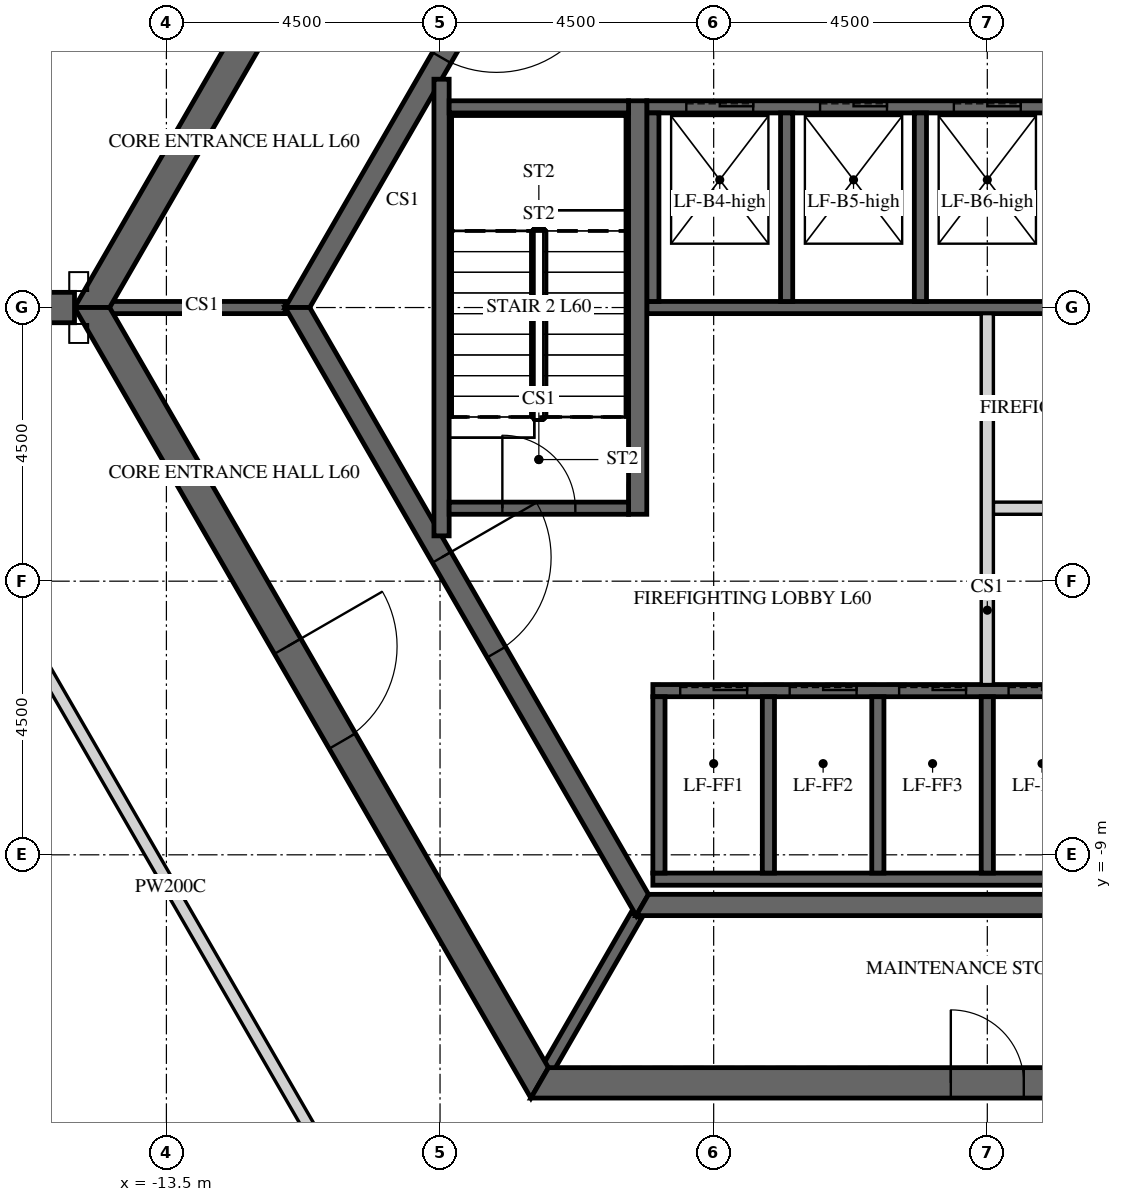
"""IFC4 building model, lengths in metres.
Left out: names, types, materials, properties, quantities, classifications, styles, units other than length and angle.
Written with IfcOpenShell. Run it as: python <this file> out.ifc"""

import sys

from ifc_helpers import new_model, si_unit, direction, frame, frame_2d, origin, place, context, subcontext, project, spatial, polyline, rectangle, outline, extrude, element, fill, save


model = new_model("IFC4")
c1 = context("Model", 3, precision=1e-05, world=origin(), true_north=direction((0.0, 1.0)))
c2 = subcontext(c1, "Body", "Model", "MODEL_VIEW")
j1 = project(units=[si_unit("LENGTHUNIT", "METRE"), si_unit("PLANEANGLEUNIT", "RADIAN")], contexts=[c1])
p1 = place(None, origin())
s1 = spatial("IfcSite", under=j1, at=p1, CompositionType="ELEMENT")
p2 = place(p1, origin())
s2 = spatial("IfcBuilding", under=s1, at=p2, CompositionType="ELEMENT")
p3 = place(p2, frame((0.0, 0.0, 250.2)))
s3 = spatial("IfcBuildingStorey", under=s2, at=p3, CompositionType="ELEMENT", Elevation=250.2)
p4 = place(p3, frame((-7.361, 12.75, -0.3), z_axis=(0.0, 0.0, 1.0), x_axis=(-0.50000571537, -0.866022103989, 0.0)))
e1 = element("IfcWall", 1, at=p4, inside=s3, PredefinedType="SHEAR", context=c2, shape_type="SweptSolid", body=[
    extrude(outline(polyline([(-0.144, -0.25), (14.867, -0.25), (14.578, 0.25), (0.144, 0.25), (-0.144, -0.25)])), origin(), (0.0, 0.0, 1.0), 5.8),
])
p5 = place(p4, frame((6.49, 0.0, 0.3)))
e2 = element("IfcOpeningElement", 2, at=p5, cuts=e1, PredefinedType="OPENING", context=c2, shape_type="SweptSolid", body=[
    extrude(rectangle(XDim=1.8, YDim=2.4, at=frame_2d((0.9, 1.2))), frame((0.0, 0.26, 0.0), z_axis=(0.0, -1.0, 0.0), x_axis=(1.0, 0.0, 0.0)), (0.0, 0.0, 1.0), 0.52),
])
p6 = place(p3, frame((-14.722, 0.0, -0.3), z_axis=(0.0, 0.0, 1.0), x_axis=(0.50000571537, -0.866022103989, 0.0)))
e3 = element("IfcWall", 3, at=p6, inside=s3, PredefinedType="SHEAR", context=c2, shape_type="SweptSolid", body=[
    extrude(outline(polyline([(-0.144, -0.25), (14.867, -0.25), (14.578, 0.25), (0.144, 0.25), (-0.144, -0.25)])), origin(), (0.0, 0.0, 1.0), 5.8),
])
p7 = place(p6, frame((6.432, 0.0, 0.3)))
e4 = element("IfcOpeningElement", 4, at=p7, cuts=e3, PredefinedType="OPENING", context=c2, shape_type="SweptSolid", body=[
    extrude(rectangle(XDim=1.8, YDim=2.4, at=frame_2d((0.9, 1.2))), frame((0.0, 0.26, 0.0), z_axis=(0.0, -1.0, 0.0), x_axis=(1.0, 0.0, 0.0)), (0.0, 0.0, 1.0), 0.52),
])
p8 = place(p3, frame((-7.361, -12.75, -0.3), z_axis=(0.0, 0.0, 1.0), x_axis=(1.0, 0.0, 0.0)))
e5 = element("IfcWall", 5, at=p8, inside=s3, PredefinedType="SHEAR", context=c2, shape_type="SweptSolid", body=[
    extrude(outline(polyline([(-0.144, -0.25), (14.866, -0.25), (14.578, 0.25), (0.144, 0.25), (-0.144, -0.25)])), origin(), (0.0, 0.0, 1.0), 5.8),
])
p9 = place(p8, frame((6.761, 0.0, 0.3)))
e6 = element("IfcOpeningElement", 6, at=p9, cuts=e5, PredefinedType="OPENING", context=c2, shape_type="SweptSolid", body=[
    extrude(rectangle(XDim=1.2, YDim=2.4, at=frame_2d((0.6, 1.2))), frame((0.0, 0.26, 0.0), z_axis=(0.0, -1.0, 0.0), x_axis=(1.0, 0.0, 0.0)), (0.0, 0.0, 1.0), 0.52),
])
p10 = place(p3, frame((-15.011, 0.0, -0.3), z_axis=(0.0, 0.0, 1.0), x_axis=(-1.0, 0.0, 0.0)))
e7 = element("IfcWall", 7, at=p10, inside=s3, PredefinedType="SHEAR", context=c2, shape_type="SweptSolid", body=[
    extrude(rectangle(XDim=15.424, YDim=0.5, at=frame_2d((7.712, 0.0))), origin(), (0.0, 0.0, 1.0), 5.8),
])
p11 = place(p10, frame((6.812, 0.0, 0.3)))
e8 = element("IfcOpeningElement", 8, at=p11, cuts=e7, PredefinedType="OPENING", context=c2, shape_type="SweptSolid", body=[
    extrude(rectangle(XDim=1.8, YDim=2.4, at=frame_2d((0.9, 1.2))), frame((0.0, 0.26, 0.0), z_axis=(0.0, -1.0, 0.0), x_axis=(1.0, 0.0, 0.0)), (0.0, 0.0, 1.0), 0.52),
])
p12 = place(p3, frame((-5.673, 9.825, -0.3), z_axis=(0.0, 0.0, 1.0), x_axis=(-0.499995046907, -0.866028263435, 0.0)))
e9 = element("IfcWall", 9, at=p12, inside=s3, PredefinedType="SHEAR", context=c2, shape_type="SweptSolid", body=[
    extrude(outline(polyline([(-0.101, -0.175), (11.446, -0.175), (11.244, 0.175), (0.101, 0.175), (-0.101, -0.175)])), origin(), (0.0, 0.0, 1.0), 5.8),
])
p13 = place(p12, frame((4.801, 0.0, 0.3)))
e10 = element("IfcOpeningElement", 10, at=p13, cuts=e9, PredefinedType="OPENING", context=c2, shape_type="SweptSolid", body=[
    extrude(rectangle(XDim=1.8, YDim=2.4, at=frame_2d((0.9, 1.2))), frame((0.0, 0.185, 0.0), z_axis=(0.0, -1.0, 0.0), x_axis=(1.0, 0.0, 0.0)), (0.0, 0.0, 1.0), 0.37),
])
p14 = place(p3, frame((-11.345, 0.0, -0.3), z_axis=(0.0, 0.0, 1.0), x_axis=(0.499995046907, -0.866028263435, 0.0)))
e11 = element("IfcWall", 11, at=p14, inside=s3, PredefinedType="SHEAR", context=c2, shape_type="SweptSolid", body=[
    extrude(outline(polyline([(-0.101, -0.175), (11.446, -0.175), (11.244, 0.175), (0.101, 0.175), (-0.101, -0.175)])), origin(), (0.0, 0.0, 1.0), 5.8),
])
p15 = place(p14, frame((4.744, 0.0, 0.3)))
e12 = element("IfcOpeningElement", 12, at=p15, cuts=e11, PredefinedType="OPENING", context=c2, shape_type="SweptSolid", body=[
    extrude(rectangle(XDim=1.8, YDim=2.4, at=frame_2d((0.9, 1.2))), frame((0.0, 0.185, 0.0), z_axis=(0.0, -1.0, 0.0), x_axis=(1.0, 0.0, 0.0)), (0.0, 0.0, 1.0), 0.37),
])
p16 = place(p3, frame((-5.673, -9.825, -0.3), z_axis=(0.0, 0.0, 1.0), x_axis=(1.0, 0.0, 0.0)))
e13 = element("IfcWall", 13, at=p16, inside=s3, PredefinedType="SHEAR", context=c2, shape_type="SweptSolid", body=[
    extrude(outline(polyline([(-0.101, -0.175), (11.446, -0.175), (11.244, 0.175), (0.101, 0.175), (-0.101, -0.175)])), origin(), (0.0, 0.0, 1.0), 5.8),
])
p17 = place(p3, frame((-5.6, 3.3, -0.25), z_axis=(0.0, 0.0, 1.0), x_axis=(1.0, 0.0, 0.0)))
e14 = element("IfcWall", 14, at=p17, inside=s3, PredefinedType="SHEAR", context=c2, shape_type="SweptSolid", body=[
    extrude(rectangle(XDim=11.2, YDim=0.2, at=frame_2d((5.6, 0.0))), origin(), (0.0, 0.0, 1.0), 5.75),
])
p18 = place(p17, frame((0.65, 0.0, 0.25)))
e15 = element("IfcOpeningElement", 15, at=p18, cuts=e14, PredefinedType="OPENING", context=c2, shape_type="SweptSolid", body=[
    extrude(rectangle(XDim=1.1, YDim=2.1, at=frame_2d((0.55, 1.05))), frame((0.0, 0.11, 0.0), z_axis=(0.0, -1.0, 0.0), x_axis=(1.0, 0.0, 0.0)), (0.0, 0.0, 1.0), 0.22),
])
p19 = place(p17, frame((2.85, 0.0, 0.25)))
e16 = element("IfcOpeningElement", 16, at=p19, cuts=e14, PredefinedType="OPENING", context=c2, shape_type="SweptSolid", body=[
    extrude(rectangle(XDim=1.1, YDim=2.1, at=frame_2d((0.55, 1.05))), frame((0.0, 0.11, 0.0), z_axis=(0.0, -1.0, 0.0), x_axis=(1.0, 0.0, 0.0)), (0.0, 0.0, 1.0), 0.22),
])
p20 = place(p17, frame((5.05, 0.0, 0.25)))
e17 = element("IfcOpeningElement", 17, at=p20, cuts=e14, PredefinedType="OPENING", context=c2, shape_type="SweptSolid", body=[
    extrude(rectangle(XDim=1.1, YDim=2.1, at=frame_2d((0.55, 1.05))), frame((0.0, 0.11, 0.0), z_axis=(0.0, -1.0, 0.0), x_axis=(1.0, 0.0, 0.0)), (0.0, 0.0, 1.0), 0.22),
])
p21 = place(p17, frame((7.25, 0.0, 0.25)))
e18 = element("IfcOpeningElement", 18, at=p21, cuts=e14, PredefinedType="OPENING", context=c2, shape_type="SweptSolid", body=[
    extrude(rectangle(XDim=1.1, YDim=2.1, at=frame_2d((0.55, 1.05))), frame((0.0, 0.11, 0.0), z_axis=(0.0, -1.0, 0.0), x_axis=(1.0, 0.0, 0.0)), (0.0, 0.0, 1.0), 0.22),
])
p22 = place(p17, frame((9.45, 0.0, 0.25)))
e19 = element("IfcOpeningElement", 19, at=p22, cuts=e14, PredefinedType="OPENING", context=c2, shape_type="SweptSolid", body=[
    extrude(rectangle(XDim=1.1, YDim=2.1, at=frame_2d((0.55, 1.05))), frame((0.0, 0.11, 0.0), z_axis=(0.0, -1.0, 0.0), x_axis=(1.0, 0.0, 0.0)), (0.0, 0.0, 1.0), 0.22),
])
p23 = place(p3, frame((-5.6, 0.0, -0.25), z_axis=(0.0, 0.0, 1.0), x_axis=(1.0, 0.0, 0.0)))
e20 = element("IfcWall", 20, at=p23, inside=s3, PredefinedType="SHEAR", context=c2, shape_type="SweptSolid", body=[
    extrude(rectangle(XDim=11.2, YDim=0.2, at=frame_2d((5.6, 0.0))), origin(), (0.0, 0.0, 1.0), 5.75),
])
for number, where, z_axis, x_axis in (
    (21, (-5.5, 0.1, -0.25), (0.0, 0.0, 1.0), (0.0, 1.0, 0.0)),
    (22, (-3.3, 0.1, -0.25), (0.0, 0.0, 1.0), (0.0, 1.0, 0.0)),
    (23, (-1.1, 0.1, -0.25), (0.0, 0.0, 1.0), (0.0, 1.0, 0.0)),
):
    element("IfcWall", number, at=place(p3, frame(where, z_axis=z_axis, x_axis=x_axis)), inside=s3, PredefinedType="SHEAR", context=c2, shape_type="SweptSolid", body=[
        extrude(rectangle(XDim=3.1, YDim=0.2, at=frame_2d((1.55, 0.0))), origin(), (0.0, 0.0, 1.0), 5.75),
    ])
p24 = place(p3, frame((-5.5, -6.3, -0.25), z_axis=(0.0, 0.0, 1.0), x_axis=(1.0, 0.0, 0.0)))
e24 = element("IfcWall", 24, at=p24, inside=s3, PredefinedType="SHEAR", context=c2, shape_type="SweptSolid", body=[
    extrude(rectangle(XDim=9.2, YDim=0.2, at=frame_2d((4.6, 0.0))), origin(), (0.0, 0.0, 1.0), 5.75),
])
p25 = place(p24, frame((0.45, 0.0, 0.25)))
e25 = element("IfcOpeningElement", 25, at=p25, cuts=e24, PredefinedType="OPENING", context=c2, shape_type="SweptSolid", body=[
    extrude(rectangle(XDim=1.1, YDim=2.1, at=frame_2d((0.55, 1.05))), frame((0.0, 0.11, 0.0), z_axis=(0.0, -1.0, 0.0), x_axis=(1.0, 0.0, 0.0)), (0.0, 0.0, 1.0), 0.22),
])
p26 = place(p24, frame((2.25, 0.0, 0.25)))
e26 = element("IfcOpeningElement", 26, at=p26, cuts=e24, PredefinedType="OPENING", context=c2, shape_type="SweptSolid", body=[
    extrude(rectangle(XDim=1.1, YDim=2.1, at=frame_2d((0.55, 1.05))), frame((0.0, 0.11, 0.0), z_axis=(0.0, -1.0, 0.0), x_axis=(1.0, 0.0, 0.0)), (0.0, 0.0, 1.0), 0.22),
])
p27 = place(p24, frame((4.05, 0.0, 0.25)))
e27 = element("IfcOpeningElement", 27, at=p27, cuts=e24, PredefinedType="OPENING", context=c2, shape_type="SweptSolid", body=[
    extrude(rectangle(XDim=1.1, YDim=2.1, at=frame_2d((0.55, 1.05))), frame((0.0, 0.11, 0.0), z_axis=(0.0, -1.0, 0.0), x_axis=(1.0, 0.0, 0.0)), (0.0, 0.0, 1.0), 0.22),
])
p28 = place(p24, frame((5.85, 0.0, 0.25)))
e28 = element("IfcOpeningElement", 28, at=p28, cuts=e24, PredefinedType="OPENING", context=c2, shape_type="SweptSolid", body=[
    extrude(rectangle(XDim=1.1, YDim=2.1, at=frame_2d((0.55, 1.05))), frame((0.0, 0.11, 0.0), z_axis=(0.0, -1.0, 0.0), x_axis=(1.0, 0.0, 0.0)), (0.0, 0.0, 1.0), 0.22),
])
p29 = place(p24, frame((7.65, 0.0, 0.25)))
e29 = element("IfcOpeningElement", 29, at=p29, cuts=e24, PredefinedType="OPENING", context=c2, shape_type="SweptSolid", body=[
    extrude(rectangle(XDim=1.1, YDim=2.1, at=frame_2d((0.55, 1.05))), frame((0.0, 0.11, 0.0), z_axis=(0.0, -1.0, 0.0), x_axis=(1.0, 0.0, 0.0)), (0.0, 0.0, 1.0), 0.22),
])
p30 = place(p3, frame((-5.5, -9.4, -0.25), z_axis=(0.0, 0.0, 1.0), x_axis=(1.0, 0.0, 0.0)))
e30 = element("IfcWall", 30, at=p30, inside=s3, PredefinedType="SHEAR", context=c2, shape_type="SweptSolid", body=[
    extrude(rectangle(XDim=9.2, YDim=0.2, at=frame_2d((4.6, 0.0))), origin(), (0.0, 0.0, 1.0), 5.75),
])
for number, where, z_axis, x_axis in (
    (31, (-5.4, -9.3, -0.25), (0.0, 0.0, 1.0), (0.0, 1.0, 0.0)),
    (32, (-3.6, -9.3, -0.25), (0.0, 0.0, 1.0), (0.0, 1.0, 0.0)),
    (33, (-1.8, -9.3, -0.25), (0.0, 0.0, 1.0), (0.0, 1.0, 0.0)),
    (34, (0.0, -9.3, -0.25), (0.0, 0.0, 1.0), (0.0, 1.0, 0.0)),
):
    element("IfcWall", number, at=place(p3, frame(where, z_axis=z_axis, x_axis=x_axis)), inside=s3, PredefinedType="SHEAR", context=c2, shape_type="SweptSolid", body=[
        extrude(rectangle(XDim=2.9, YDim=0.2, at=frame_2d((1.45, 0.0))), origin(), (0.0, 0.0, 1.0), 5.75),
    ])
p31 = place(p3, frame((0.1, -3.3, 0.0), z_axis=(0.0, 0.0, 1.0), x_axis=(1.0, 0.0, 0.0)))
e35 = element("IfcWall", 35, at=p31, inside=s3, PredefinedType="PARTITIONING", context=c2, shape_type="SweptSolid", body=[
    extrude(rectangle(XDim=5.5, YDim=0.2, at=frame_2d((2.75, 0.0))), origin(), (0.0, 0.0, 1.0), 5.5),
])
p32 = place(p31, frame((2.3, 0.0, 0.0)))
e36 = element("IfcOpeningElement", 36, at=p32, cuts=e35, PredefinedType="OPENING", context=c2, shape_type="SweptSolid", body=[
    extrude(rectangle(XDim=0.9, YDim=2.1, at=frame_2d((0.45, 1.05))), frame((0.0, 0.11, 0.0), z_axis=(0.0, -1.0, 0.0), x_axis=(1.0, 0.0, 0.0)), (0.0, 0.0, 1.0), 0.22),
])
p33 = place(p3, frame((0.0, -6.2, 0.0), z_axis=(0.0, 0.0, 1.0), x_axis=(0.0, 1.0, 0.0)))
e37 = element("IfcWall", 37, at=p33, inside=s3, PredefinedType="PARTITIONING", context=c2, shape_type="SweptSolid", body=[
    extrude(rectangle(XDim=6.1, YDim=0.2, at=frame_2d((3.05, 0.0))), origin(), (0.0, 0.0, 1.0), 5.5),
])
for number, where, z_axis, x_axis in (
    (38, (-11.547, 0.0, -0.3), (0.0, 0.0, 1.0), (-1.0, 0.0, 0.0)),
    (39, (-5.773, -10.0, -0.3), (0.0, 0.0, 1.0), (-0.5, -0.866, 0.0)),
):
    element("IfcWall", number, at=place(p3, frame(where, z_axis=z_axis, x_axis=x_axis)), inside=s3, PredefinedType="SHEAR", context=c2, shape_type="SweptSolid", body=[
        extrude(rectangle(XDim=2.887, YDim=0.2, at=frame_2d((1.443, 0.0))), origin(), (0.0, 0.0, 1.0), 5.8),
    ])
p34 = place(p3, frame((-5.75, -3.4, -0.25), z_axis=(0.0, 0.0, 1.0), x_axis=(0.0, 1.0, 0.0)))
e40 = element("IfcWall", 40, at=p34, inside=s3, PredefinedType="SHEAR", context=c2, shape_type="SweptSolid", body=[
    extrude(rectangle(XDim=6.8, YDim=0.3, at=frame_2d((3.4, 0.0))), origin(), (0.0, 0.0, 1.0), 5.75),
])
p35 = place(p3, frame((-8.975, -3.755, -0.25), z_axis=(0.0, 0.0, 1.0), x_axis=(0.0, 1.0, 0.0)))
e41 = element("IfcWall", 41, at=p35, inside=s3, PredefinedType="SHEAR", context=c2, shape_type="SweptSolid", body=[
    extrude(rectangle(XDim=7.51, YDim=0.25, at=frame_2d((3.755, 0.0))), origin(), (0.0, 0.0, 1.0), 5.75),
])
p36 = place(p3, frame((-8.85, 3.3, -0.25), z_axis=(0.0, 0.0, 1.0), x_axis=(1.0, 0.0, 0.0)))
e42 = element("IfcWall", 42, at=p36, inside=s3, PredefinedType="SHEAR", context=c2, shape_type="SweptSolid", body=[
    extrude(rectangle(XDim=2.95, YDim=0.2, at=frame_2d((1.475, 0.0))), origin(), (0.0, 0.0, 1.0), 5.75),
])
p37 = place(p3, frame((-8.85, -3.3, -0.25), z_axis=(0.0, 0.0, 1.0), x_axis=(1.0, 0.0, 0.0)))
e43 = element("IfcWall", 43, at=p37, inside=s3, PredefinedType="SHEAR", context=c2, shape_type="SweptSolid", body=[
    extrude(rectangle(XDim=2.95, YDim=0.2, at=frame_2d((1.475, 0.0))), origin(), (0.0, 0.0, 1.0), 5.75),
])
p38 = place(p37, frame((0.875, 0.0, 0.25)))
e44 = element("IfcOpeningElement", 44, at=p38, cuts=e43, PredefinedType="OPENING", context=c2, shape_type="SweptSolid", body=[
    extrude(rectangle(XDim=1.2, YDim=2.4, at=frame_2d((0.6, 1.2))), frame((0.0, 0.11, 0.0), z_axis=(0.0, -1.0, 0.0), x_axis=(1.0, 0.0, 0.0)), (0.0, 0.0, 1.0), 0.22),
])
p39 = place(p3, frame((-13.172, 19.825, 0.0), z_axis=(0.0, 0.0, 1.0), x_axis=(-0.499999503755, -0.866025690291, 0.0)))
e45 = element("IfcWall", 45, at=p39, inside=s3, PredefinedType="PARTITIONING", context=c2, shape_type="SweptSolid", body=[
    extrude(rectangle(XDim=18.943, YDim=0.2, at=frame_2d((9.471, 0.0))), origin(), (0.0, 0.0, 1.0), 5.5),
])
p40 = place(p39, frame((8.572, 0.0, 0.0)))
e46 = element("IfcOpeningElement", 46, at=p40, cuts=e45, PredefinedType="OPENING", context=c2, shape_type="SweptSolid", body=[
    extrude(rectangle(XDim=1.8, YDim=2.1, at=frame_2d((0.9, 1.05))), frame((0.0, 0.11, 0.0), z_axis=(0.0, -1.0, 0.0), x_axis=(1.0, 0.0, 0.0)), (0.0, 0.0, 1.0), 0.22),
])
p41 = place(p3, frame((-17.395, -2.67, 0.0), z_axis=(0.0, 0.0, 1.0), x_axis=(0.499971736126, -0.866041721325, 0.0)))
e47 = element("IfcWall", 47, at=p41, inside=s3, PredefinedType="PARTITIONING", context=c2, shape_type="SweptSolid", body=[
    extrude(rectangle(XDim=15.854, YDim=0.2, at=frame_2d((7.927, 0.0))), origin(), (0.0, 0.0, 1.0), 5.5),
])
p42 = place(p3, frame((-22.63, -3.443, 0.0), z_axis=(0.0, 0.0, 1.0), x_axis=(0.49999205116, -0.866029993001, 0.0)))
e48 = element("IfcWall", 48, at=p42, inside=s3, PredefinedType="PARTITIONING", context=c2, shape_type="SweptSolid", body=[
    extrude(rectangle(XDim=20.642, YDim=0.2, at=frame_2d((10.321, 0.0))), origin(), (0.0, 0.0, 1.0), 5.5),
])
p43 = place(p42, frame((9.821, 0.0, 0.0)))
e49 = element("IfcOpeningElement", 49, at=p43, cuts=e48, PredefinedType="OPENING", context=c2, shape_type="SweptSolid", body=[
    extrude(rectangle(XDim=1.0, YDim=2.1, at=frame_2d((0.5, 1.05))), frame((0.0, 0.11, 0.0), z_axis=(0.0, -1.0, 0.0), x_axis=(1.0, 0.0, 0.0)), (0.0, 0.0, 1.0), 0.22),
])
p44 = place(p3, frame((-10.174, 15.177, 0.0), z_axis=(0.0, 0.0, 1.0), x_axis=(-0.500018949701, -0.866014462893, 0.0)))
e50 = element("IfcWall", 50, at=p44, inside=s3, PredefinedType="PARTITIONING", context=c2, shape_type="SweptSolid", body=[
    extrude(rectangle(XDim=14.469, YDim=0.15, at=frame_2d((7.235, 0.0))), origin(), (0.0, 0.0, 1.0), 5.5),
])
p45 = place(p7, origin())
e51 = element("IfcDoor", 51, at=p45, inside=s3, OperationType="DOUBLE_DOOR_SINGLE_SWING", PredefinedType="DOOR", context=c2, shape_type="SweptSolid", body=[
    extrude(rectangle(XDim=1.8, YDim=2.4, at=frame_2d((0.9, 1.2))), frame((0.0, 0.025, 0.0), z_axis=(0.0, -1.0, 0.0), x_axis=(1.0, 0.0, 0.0)), (0.0, 0.0, 1.0), 0.05),
])
fill(e4, e51)
p46 = place(p9, origin())
e52 = element("IfcDoor", 52, at=p46, inside=s3, OperationType="SINGLE_SWING_LEFT", PredefinedType="DOOR", context=c2, shape_type="SweptSolid", body=[
    extrude(rectangle(XDim=1.2, YDim=2.4, at=frame_2d((0.6, 1.2))), frame((0.0, 0.025, 0.0), z_axis=(0.0, -1.0, 0.0), x_axis=(1.0, 0.0, 0.0)), (0.0, 0.0, 1.0), 0.05),
])
fill(e6, e52)
p47 = place(p13, origin())
e53 = element("IfcDoor", 53, at=p47, inside=s3, OperationType="DOUBLE_DOOR_SINGLE_SWING", PredefinedType="DOOR", context=c2, shape_type="SweptSolid", body=[
    extrude(rectangle(XDim=1.8, YDim=2.4, at=frame_2d((0.9, 1.2))), frame((0.0, 0.025, 0.0), z_axis=(0.0, -1.0, 0.0), x_axis=(1.0, 0.0, 0.0)), (0.0, 0.0, 1.0), 0.05),
])
fill(e10, e53)
p48 = place(p15, origin())
e54 = element("IfcDoor", 54, at=p48, inside=s3, OperationType="DOUBLE_DOOR_SINGLE_SWING", PredefinedType="DOOR", context=c2, shape_type="SweptSolid", body=[
    extrude(rectangle(XDim=1.8, YDim=2.4, at=frame_2d((0.9, 1.2))), frame((0.0, 0.025, 0.0), z_axis=(0.0, -1.0, 0.0), x_axis=(1.0, 0.0, 0.0)), (0.0, 0.0, 1.0), 0.05),
])
fill(e12, e54)
p49 = place(p38, origin())
e55 = element("IfcDoor", 55, at=p49, inside=s3, OperationType="SINGLE_SWING_LEFT", PredefinedType="DOOR", context=c2, shape_type="SweptSolid", body=[
    extrude(rectangle(XDim=1.2, YDim=2.4, at=frame_2d((0.6, 1.2))), frame((0.0, 0.025, 0.0), z_axis=(0.0, -1.0, 0.0), x_axis=(1.0, 0.0, 0.0)), (0.0, 0.0, 1.0), 0.05),
])
fill(e44, e55)
p50 = place(p18, origin())
e56 = element("IfcDoor", 56, at=p50, inside=s3, OperationType="SLIDING_TO_LEFT", PredefinedType="DOOR", context=c2, shape_type="SweptSolid", body=[
    extrude(rectangle(XDim=1.1, YDim=2.1, at=frame_2d((0.55, 1.05))), frame((0.0, 0.025, 0.0), z_axis=(0.0, -1.0, 0.0), x_axis=(1.0, 0.0, 0.0)), (0.0, 0.0, 1.0), 0.05),
])
fill(e15, e56)
p51 = place(p19, origin())
e57 = element("IfcDoor", 57, at=p51, inside=s3, OperationType="SLIDING_TO_LEFT", PredefinedType="DOOR", context=c2, shape_type="SweptSolid", body=[
    extrude(rectangle(XDim=1.1, YDim=2.1, at=frame_2d((0.55, 1.05))), frame((0.0, 0.025, 0.0), z_axis=(0.0, -1.0, 0.0), x_axis=(1.0, 0.0, 0.0)), (0.0, 0.0, 1.0), 0.05),
])
fill(e16, e57)
p52 = place(p20, origin())
e58 = element("IfcDoor", 58, at=p52, inside=s3, OperationType="SLIDING_TO_LEFT", PredefinedType="DOOR", context=c2, shape_type="SweptSolid", body=[
    extrude(rectangle(XDim=1.1, YDim=2.1, at=frame_2d((0.55, 1.05))), frame((0.0, 0.025, 0.0), z_axis=(0.0, -1.0, 0.0), x_axis=(1.0, 0.0, 0.0)), (0.0, 0.0, 1.0), 0.05),
])
fill(e17, e58)
p53 = place(p25, origin())
e59 = element("IfcDoor", 59, at=p53, inside=s3, OperationType="SLIDING_TO_LEFT", PredefinedType="DOOR", context=c2, shape_type="SweptSolid", body=[
    extrude(rectangle(XDim=1.1, YDim=2.1, at=frame_2d((0.55, 1.05))), frame((0.0, 0.025, 0.0), z_axis=(0.0, -1.0, 0.0), x_axis=(1.0, 0.0, 0.0)), (0.0, 0.0, 1.0), 0.05),
])
fill(e25, e59)
p54 = place(p26, origin())
e60 = element("IfcDoor", 60, at=p54, inside=s3, OperationType="SLIDING_TO_LEFT", PredefinedType="DOOR", context=c2, shape_type="SweptSolid", body=[
    extrude(rectangle(XDim=1.1, YDim=2.1, at=frame_2d((0.55, 1.05))), frame((0.0, 0.025, 0.0), z_axis=(0.0, -1.0, 0.0), x_axis=(1.0, 0.0, 0.0)), (0.0, 0.0, 1.0), 0.05),
])
fill(e26, e60)
p55 = place(p27, origin())
e61 = element("IfcDoor", 61, at=p55, inside=s3, OperationType="SLIDING_TO_LEFT", PredefinedType="DOOR", context=c2, shape_type="SweptSolid", body=[
    extrude(rectangle(XDim=1.1, YDim=2.1, at=frame_2d((0.55, 1.05))), frame((0.0, 0.025, 0.0), z_axis=(0.0, -1.0, 0.0), x_axis=(1.0, 0.0, 0.0)), (0.0, 0.0, 1.0), 0.05),
])
fill(e27, e61)
p56 = place(p28, origin())
e62 = element("IfcDoor", 62, at=p56, inside=s3, OperationType="SLIDING_TO_LEFT", PredefinedType="DOOR", context=c2, shape_type="SweptSolid", body=[
    extrude(rectangle(XDim=1.1, YDim=2.1, at=frame_2d((0.55, 1.05))), frame((0.0, 0.025, 0.0), z_axis=(0.0, -1.0, 0.0), x_axis=(1.0, 0.0, 0.0)), (0.0, 0.0, 1.0), 0.05),
])
fill(e28, e62)
save(model, sys.argv[1])
